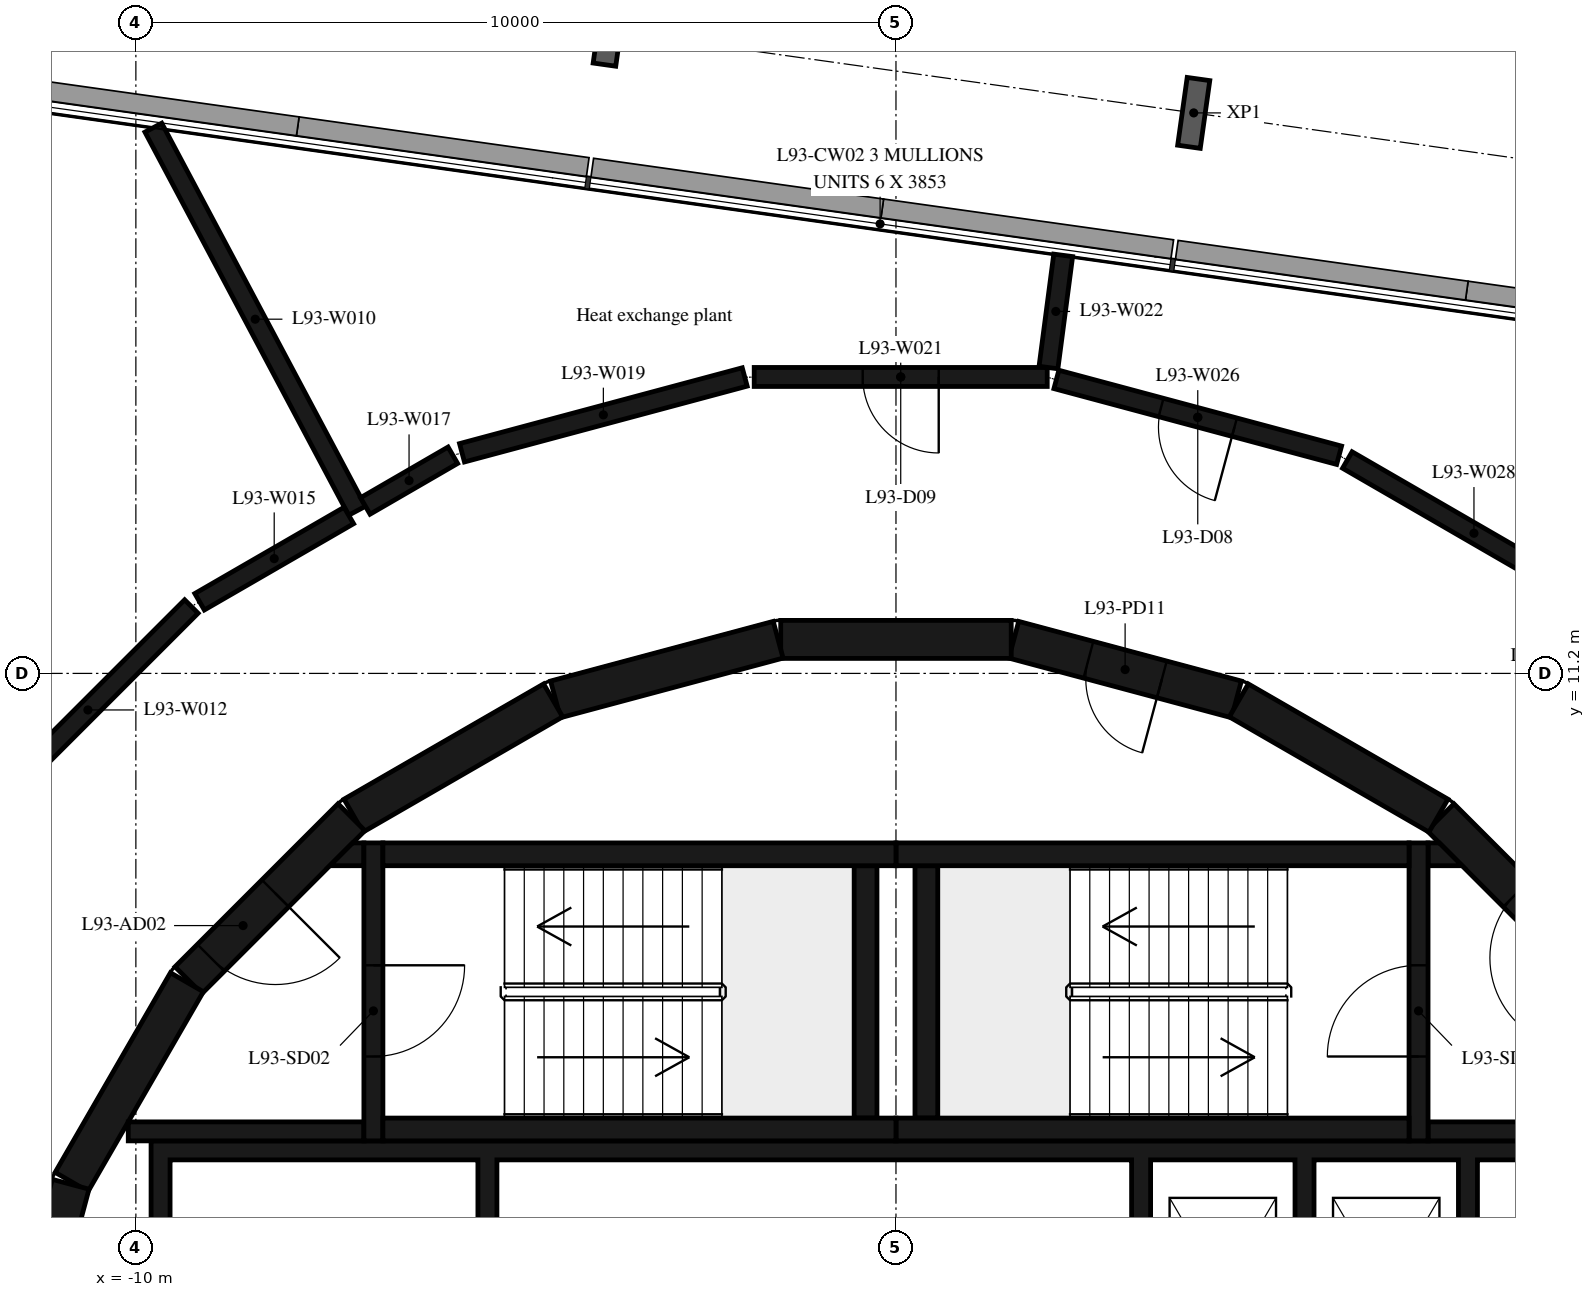
"""IFC4 building model, lengths in metres.
Left out: names, types, materials, properties, quantities, classifications, styles, units other than length and angle.
Written with IfcOpenShell. Run it as: python <this file> out.ifc"""

import sys

from ifc_helpers import new_model, si_unit, direction, frame, frame_2d, origin, origin_2d, place, context, subcontext, project, spatial, polyline, rectangle, i_section, outline, extrude, element, fill, save


model = new_model("IFC4")
c1 = context("Model", 3, precision=1e-05, world=origin(), true_north=direction((0.0, 1.0)))
c2 = subcontext(c1, "Body", "Model", "MODEL_VIEW")
j1 = project(units=[si_unit("LENGTHUNIT", "METRE"), si_unit("PLANEANGLEUNIT", "RADIAN")], contexts=[c1])
p1 = place(None, origin())
s1 = spatial("IfcSite", under=j1, at=p1, CompositionType="ELEMENT")
p2 = place(p1, origin())
s2 = spatial("IfcBuilding", under=s1, at=p2, CompositionType="ELEMENT")
p3 = place(p2, frame((0.0, 0.0, 361.0)))
s3 = spatial("IfcBuildingStorey", under=s2, at=p3, CompositionType="ELEMENT", Elevation=361.0)
for number, where, z_axis, x_axis in (
    (1, (3.917, 18.574, -0.38), (0.0, 0.0, 1.0), (0.99, -0.139, 0.0)),
    (2, (-3.773, 19.655, -0.38), (0.0, 0.0, 1.0), (0.99, -0.139, 0.0)),
):
    element("IfcColumn", number, at=place(p3, frame(where, z_axis=z_axis, x_axis=x_axis)), inside=s3, PredefinedType="COLUMN", context=c2, shape_type="SweptSolid", body=[
        extrude(i_section(OverallWidth=0.3, OverallDepth=0.9, WebThickness=0.019, FlangeThickness=0.035, FilletRadius=0.03, at=origin_2d()), origin(), (0.0, 0.0, 1.0), 5.2),
    ])
p4 = place(p3, frame((9.308, 7.164, 0.0), z_axis=(0.0, 0.0, 1.0), x_axis=(-0.707106781187, 0.707106781187, 0.0)))
e3 = element("IfcWall", 3, at=p4, inside=s3, PredefinedType="SHEAR", context=c2, shape_type="SweptSolid", body=[
    extrude(rectangle(XDim=3.032, YDim=0.5, at=frame_2d((1.516, 0.0))), origin(), (0.0, 0.0, 1.0), 4.82),
])
p5 = place(p4, frame((0.416, 0.0, 0.0)))
e4 = element("IfcOpeningElement", 4, at=p5, cuts=e3, PredefinedType="OPENING", context=c2, shape_type="SweptSolid", body=[
    extrude(rectangle(XDim=1.2, YDim=2.1, at=frame_2d((0.6, 1.05))), frame((0.0, 0.26, 0.0), z_axis=(0.0, -1.0, 0.0), x_axis=(1.0, 0.0, 0.0)), (0.0, 0.0, 1.0), 0.52),
])
p6 = place(p3, frame((7.137, 9.329, 0.0), z_axis=(0.0, 0.0, 1.0), x_axis=(-0.865975092491, 0.500087131594, 0.0)))
e5 = element("IfcWall", 5, at=p6, inside=s3, PredefinedType="SHEAR", context=c2, shape_type="SweptSolid", body=[
    extrude(rectangle(XDim=3.033, YDim=0.5, at=frame_2d((1.516, 0.0))), origin(), (0.0, 0.0, 1.0), 4.82),
])
p7 = place(p3, frame((4.479, 10.858, 0.0), z_axis=(0.0, 0.0, 1.0), x_axis=(-0.965948410781, 0.258734743916, 0.0)))
e6 = element("IfcWall", 6, at=p7, inside=s3, PredefinedType="SHEAR", context=c2, shape_type="SweptSolid", body=[
    extrude(rectangle(XDim=3.033, YDim=0.5, at=frame_2d((1.516, 0.0))), origin(), (0.0, 0.0, 1.0), 4.82),
])
p8 = place(p7, frame((1.016, 0.0, 0.0)))
e7 = element("IfcOpeningElement", 7, at=p8, cuts=e6, PredefinedType="OPENING", context=c2, shape_type="SweptSolid", body=[
    extrude(rectangle(XDim=1.0, YDim=2.4, at=frame_2d((0.5, 1.2))), frame((0.0, 0.26, 0.0), z_axis=(0.0, -1.0, 0.0), x_axis=(1.0, 0.0, 0.0)), (0.0, 0.0, 1.0), 0.52),
])
for number, where, z_axis, x_axis in (
    (8, (1.516, 11.647, 0.0), (0.0, 0.0, 1.0), (-1.0, 0.0, 0.0)),
    (9, (-1.55, 11.643, 0.0), (0.0, 0.0, 1.0), (-0.966, -0.259, 0.0)),
    (10, (-4.51, 10.845, 0.0), (0.0, 0.0, 1.0), (-0.866, -0.5, 0.0)),
):
    element("IfcWall", number, at=place(p3, frame(where, z_axis=z_axis, x_axis=x_axis)), inside=s3, PredefinedType="SHEAR", context=c2, shape_type="SweptSolid", body=[
        extrude(rectangle(XDim=3.033, YDim=0.5, at=frame_2d((1.516, 0.0))), origin(), (0.0, 0.0, 1.0), 4.82),
    ])
p9 = place(p3, frame((-7.164, 9.308, 0.0), z_axis=(0.0, 0.0, 1.0), x_axis=(-0.707106781187, -0.707106781187, 0.0)))
e11 = element("IfcWall", 11, at=p9, inside=s3, PredefinedType="SHEAR", context=c2, shape_type="SweptSolid", body=[
    extrude(rectangle(XDim=3.032, YDim=0.5, at=frame_2d((1.516, 0.0))), origin(), (0.0, 0.0, 1.0), 4.82),
])
p10 = place(p9, frame((1.416, 0.0, 0.0)))
e12 = element("IfcOpeningElement", 12, at=p10, cuts=e11, PredefinedType="OPENING", context=c2, shape_type="SweptSolid", body=[
    extrude(rectangle(XDim=1.2, YDim=2.1, at=frame_2d((0.6, 1.05))), frame((0.0, 0.26, 0.0), z_axis=(0.0, -1.0, 0.0), x_axis=(1.0, 0.0, 0.0)), (0.0, 0.0, 1.0), 0.52),
])
for number, where, z_axis, x_axis in (
    (13, (-9.329, 7.137, 0.0), (0.0, 0.0, 1.0), (-0.5, -0.866, 0.0)),
    (14, (-10.858, 4.479, 0.0), (0.0, 0.0, 1.0), (-0.259, -0.966, 0.0)),
):
    element("IfcWall", number, at=place(p3, frame(where, z_axis=z_axis, x_axis=x_axis)), inside=s3, PredefinedType="SHEAR", context=c2, shape_type="SweptSolid", body=[
        extrude(rectangle(XDim=3.033, YDim=0.5, at=frame_2d((1.516, 0.0))), origin(), (0.0, 0.0, 1.0), 4.82),
    ])
for number, where, z_axis, x_axis in (
    (15, (0.0, 5.2, 0.0), (0.0, 0.0, 1.0), (1.0, 0.0, 0.0)),
    (16, (0.0, 8.82, 0.0), (0.0, 0.0, 1.0), (1.0, 0.0, 0.0)),
):
    element("IfcWall", number, at=place(p3, frame(where, z_axis=z_axis, x_axis=x_axis)), inside=s3, PredefinedType="SHEAR", context=c2, shape_type="SweptSolid", body=[
        extrude(rectangle(XDim=6.75, YDim=0.3, at=frame_2d((3.375, 0.0))), origin(), (0.0, 0.0, 1.0), 4.82),
    ])
p11 = place(p3, frame((0.4, 5.35, 0.0), z_axis=(0.0, 0.0, 1.0), x_axis=(0.0, 1.0, 0.0)))
e17 = element("IfcWall", 17, at=p11, inside=s3, PredefinedType="SHEAR", context=c2, shape_type="SweptSolid", body=[
    extrude(rectangle(XDim=3.32, YDim=0.3, at=frame_2d((1.66, 0.0))), origin(), (0.0, 0.0, 1.0), 4.82),
])
p12 = place(p3, frame((6.875, 5.05, 0.0), z_axis=(0.0, 0.0, 1.0), x_axis=(0.0, 1.0, 0.0)))
e18 = element("IfcWall", 18, at=p12, inside=s3, PredefinedType="SHEAR", context=c2, shape_type="SweptSolid", body=[
    extrude(rectangle(XDim=3.92, YDim=0.25, at=frame_2d((1.96, 0.0))), origin(), (0.0, 0.0, 1.0), 4.82),
])
p13 = place(p12, frame((1.11, 0.0, 0.0)))
e19 = element("IfcOpeningElement", 19, at=p13, cuts=e18, PredefinedType="OPENING", context=c2, shape_type="SweptSolid", body=[
    extrude(rectangle(XDim=1.2, YDim=2.1, at=frame_2d((0.6, 1.05))), frame((0.0, 0.135, 0.0), z_axis=(0.0, -1.0, 0.0), x_axis=(1.0, 0.0, 0.0)), (0.0, 0.0, 1.0), 0.27),
])
p14 = place(p3, frame((7.0, 5.175, 0.0), z_axis=(0.0, 0.0, 1.0), x_axis=(1.0, 0.0, 0.0)))
e20 = element("IfcWall", 20, at=p14, inside=s3, PredefinedType="SHEAR", context=c2, shape_type="SweptSolid", body=[
    extrude(rectangle(XDim=3.1, YDim=0.25, at=frame_2d((1.55, 0.0))), origin(), (0.0, 0.0, 1.0), 4.82),
])
p15 = place(p3, origin())
e21 = element("IfcWall", 21, at=p15, inside=s3, PredefinedType="SHEAR", context=c2, shape_type="SweptSolid", body=[
    extrude(outline(polyline([(7.448, 8.67), (7.0, 8.67), (7.0, 8.97), (7.148, 8.97), (7.448, 8.67)])), origin(), (0.0, 0.0, 1.0), 4.82),
])
for number, where, z_axis, x_axis in (
    (22, (-6.75, 5.2, 0.0), (0.0, 0.0, 1.0), (1.0, 0.0, 0.0)),
    (23, (-6.75, 8.82, 0.0), (0.0, 0.0, 1.0), (1.0, 0.0, 0.0)),
):
    element("IfcWall", number, at=place(p3, frame(where, z_axis=z_axis, x_axis=x_axis)), inside=s3, PredefinedType="SHEAR", context=c2, shape_type="SweptSolid", body=[
        extrude(rectangle(XDim=6.75, YDim=0.3, at=frame_2d((3.375, 0.0))), origin(), (0.0, 0.0, 1.0), 4.82),
    ])
p16 = place(p3, frame((-0.4, 5.35, 0.0), z_axis=(0.0, 0.0, 1.0), x_axis=(0.0, 1.0, 0.0)))
e24 = element("IfcWall", 24, at=p16, inside=s3, PredefinedType="SHEAR", context=c2, shape_type="SweptSolid", body=[
    extrude(rectangle(XDim=3.32, YDim=0.3, at=frame_2d((1.66, 0.0))), origin(), (0.0, 0.0, 1.0), 4.82),
])
p17 = place(p3, frame((-6.875, 8.97, 0.0), z_axis=(0.0, 0.0, 1.0), x_axis=(0.0, -1.0, 0.0)))
e25 = element("IfcWall", 25, at=p17, inside=s3, PredefinedType="SHEAR", context=c2, shape_type="SweptSolid", body=[
    extrude(rectangle(XDim=3.92, YDim=0.25, at=frame_2d((1.96, 0.0))), origin(), (0.0, 0.0, 1.0), 4.82),
])
p18 = place(p17, frame((1.61, 0.0, 0.0)))
e26 = element("IfcOpeningElement", 26, at=p18, cuts=e25, PredefinedType="OPENING", context=c2, shape_type="SweptSolid", body=[
    extrude(rectangle(XDim=1.2, YDim=2.1, at=frame_2d((0.6, 1.05))), frame((0.0, 0.135, 0.0), z_axis=(0.0, -1.0, 0.0), x_axis=(1.0, 0.0, 0.0)), (0.0, 0.0, 1.0), 0.27),
])
p19 = place(p3, frame((-7.0, 5.175, 0.0), z_axis=(0.0, 0.0, 1.0), x_axis=(-1.0, 0.0, 0.0)))
e27 = element("IfcWall", 27, at=p19, inside=s3, PredefinedType="SHEAR", context=c2, shape_type="SweptSolid", body=[
    extrude(rectangle(XDim=3.1, YDim=0.25, at=frame_2d((1.55, 0.0))), origin(), (0.0, 0.0, 1.0), 4.82),
])
p20 = place(p3, origin())
e28 = element("IfcWall", 28, at=p20, inside=s3, PredefinedType="SHEAR", context=c2, shape_type="SweptSolid", body=[
    extrude(outline(polyline([(-7.148, 8.97), (-7.0, 8.97), (-7.0, 8.67), (-7.448, 8.67), (-7.148, 8.97)])), origin(), (0.0, 0.0, 1.0), 4.82),
])
p21 = place(p3, origin())
e29 = element("IfcWall", 29, at=p21, inside=s3, PredefinedType="SHEAR", context=c2, shape_type="SweptSolid", body=[
    extrude(outline(polyline([(-9.8, 1.9), (-9.55, 1.9), (-9.55, 4.8), (-5.5, 4.8), (-5.5, 1.9), (-5.25, 1.9), (-5.25, 4.8), (3.1, 4.8), (3.1, 1.9), (3.35, 1.9), (3.35, 4.8), (5.25, 4.8), (5.25, 1.9), (5.5, 1.9), (5.5, 4.8), (7.4, 4.8), (7.4, 1.9), (7.65, 1.9), (7.65, 4.8), (9.55, 4.8), (9.55, 1.9), (9.8, 1.9), (9.8, 4.8), (9.8, 5.05), (-9.8, 5.05), (-9.8, 4.8), (-9.8, 1.9)])), origin(), (0.0, 0.0, 1.0), 4.82),
])
p22 = place(p3, frame((-9.77, 18.38, 0.0), z_axis=(0.0, 0.0, 1.0), x_axis=(0.469502312853, -0.882931242072, 0.0)))
e30 = element("IfcWall", 30, at=p22, inside=s3, PredefinedType="PARTITIONING", context=c2, shape_type="SweptSolid", body=[
    extrude(rectangle(XDim=5.708, YDim=0.25, at=frame_2d((2.854, 0.0))), origin(), (0.0, 0.0, 1.0), 4.82),
])
p23 = place(p3, frame((-9.27, 12.08, 0.0), z_axis=(0.0, 0.0, 1.0), x_axis=(-0.707106781187, -0.707106781187, 0.0)))
e31 = element("IfcWall", 31, at=p23, inside=s3, PredefinedType="PARTITIONING", context=c2, shape_type="SweptSolid", body=[
    extrude(rectangle(XDim=3.849, YDim=0.25, at=frame_2d((1.925, 0.0))), origin(), (0.0, 0.0, 1.0), 4.82),
])
p24 = place(p3, frame((-7.198, 13.277, 0.0), z_axis=(0.0, 0.0, 1.0), x_axis=(-0.865821548015, -0.500352922439, 0.0)))
e32 = element("IfcWall", 32, at=p24, inside=s3, PredefinedType="PARTITIONING", context=c2, shape_type="SweptSolid", body=[
    extrude(rectangle(XDim=2.268, YDim=0.25, at=frame_2d((1.134, 0.0))), origin(), (0.0, 0.0, 1.0), 4.82),
])
p25 = place(p3, frame((-5.83, 14.07, 0.0), z_axis=(0.0, 0.0, 1.0), x_axis=(-0.865225325987, -0.501383221968, 0.0)))
e33 = element("IfcWall", 33, at=p25, inside=s3, PredefinedType="PARTITIONING", context=c2, shape_type="SweptSolid", body=[
    extrude(rectangle(XDim=1.331, YDim=0.25, at=frame_2d((0.666, 0.0))), origin(), (0.0, 0.0, 1.0), 4.82),
])
p26 = place(p3, frame((-1.99, 15.1, 0.0), z_axis=(0.0, 0.0, 1.0), x_axis=(-0.965845546311, -0.259118468411, 0.0)))
e34 = element("IfcWall", 34, at=p26, inside=s3, PredefinedType="PARTITIONING", context=c2, shape_type="SweptSolid", body=[
    extrude(rectangle(XDim=3.851, YDim=0.25, at=frame_2d((1.925, 0.0))), origin(), (0.0, 0.0, 1.0), 4.82),
])
p27 = place(p3, frame((1.99, 15.1, 0.0), z_axis=(0.0, 0.0, 1.0), x_axis=(-1.0, 0.0, 0.0)))
e35 = element("IfcWall", 35, at=p27, inside=s3, PredefinedType="PARTITIONING", context=c2, shape_type="SweptSolid", body=[
    extrude(rectangle(XDim=3.855, YDim=0.25, at=frame_2d((1.927, 0.0))), origin(), (0.0, 0.0, 1.0), 4.82),
])
p28 = place(p27, frame((1.427, 0.0, 0.0)))
e36 = element("IfcOpeningElement", 36, at=p28, cuts=e35, PredefinedType="OPENING", context=c2, shape_type="SweptSolid", body=[
    extrude(rectangle(XDim=1.0, YDim=2.1, at=frame_2d((0.5, 1.05))), frame((0.0, 0.135, 0.0), z_axis=(0.0, -1.0, 0.0), x_axis=(1.0, 0.0, 0.0)), (0.0, 0.0, 1.0), 0.27),
])
p29 = place(p3, frame((2.006, 15.224, 0.0), z_axis=(0.0, 0.0, 1.0), x_axis=(0.13004725163, 0.991507797419, 0.0)))
e37 = element("IfcWall", 37, at=p29, inside=s3, PredefinedType="PARTITIONING", context=c2, shape_type="SweptSolid", body=[
    extrude(rectangle(XDim=1.489, YDim=0.25, at=frame_2d((0.744, 0.0))), origin(), (0.0, 0.0, 1.0), 4.82),
])
p30 = place(p3, frame((5.83, 14.07, 0.0), z_axis=(0.0, 0.0, 1.0), x_axis=(-0.965861411942, 0.259059323171, 0.0)))
e38 = element("IfcWall", 38, at=p30, inside=s3, PredefinedType="PARTITIONING", context=c2, shape_type="SweptSolid", body=[
    extrude(rectangle(XDim=3.851, YDim=0.25, at=frame_2d((1.925, 0.0))), origin(), (0.0, 0.0, 1.0), 4.82),
])
p31 = place(p30, frame((1.425, 0.0, 0.0)))
e39 = element("IfcOpeningElement", 39, at=p31, cuts=e38, PredefinedType="OPENING", context=c2, shape_type="SweptSolid", body=[
    extrude(rectangle(XDim=1.0, YDim=2.1, at=frame_2d((0.5, 1.05))), frame((0.0, 0.135, 0.0), z_axis=(0.0, -1.0, 0.0), x_axis=(1.0, 0.0, 0.0)), (0.0, 0.0, 1.0), 0.27),
])
p32 = place(p3, frame((9.27, 12.08, 0.0), z_axis=(0.0, 0.0, 1.0), x_axis=(-0.865615852585, 0.500708693508, 0.0)))
e40 = element("IfcWall", 40, at=p32, inside=s3, PredefinedType="PARTITIONING", context=c2, shape_type="SweptSolid", body=[
    extrude(rectangle(XDim=3.849, YDim=0.25, at=frame_2d((1.925, 0.0))), origin(), (0.0, 0.0, 1.0), 4.82),
])
p33 = place(p13, origin())
e41 = element("IfcDoor", 41, at=p33, inside=s3, OperationType="SINGLE_SWING_LEFT", PredefinedType="DOOR", context=c2, shape_type="SweptSolid", body=[
    extrude(rectangle(XDim=1.2, YDim=2.1, at=frame_2d((0.6, 1.05))), frame((0.0, 0.025, 0.0), z_axis=(0.0, -1.0, 0.0), x_axis=(1.0, 0.0, 0.0)), (0.0, 0.0, 1.0), 0.05),
])
fill(e19, e41)
p34 = place(p5, origin())
e42 = element("IfcDoor", 42, at=p34, inside=s3, OperationType="SINGLE_SWING_RIGHT", PredefinedType="DOOR", context=c2, shape_type="SweptSolid", body=[
    extrude(rectangle(XDim=1.2, YDim=2.1, at=frame_2d((0.6, 1.05))), frame((0.0, 0.025, 0.0), z_axis=(0.0, -1.0, 0.0), x_axis=(1.0, 0.0, 0.0)), (0.0, 0.0, 1.0), 0.05),
])
fill(e4, e42)
p35 = place(p18, origin())
e43 = element("IfcDoor", 43, at=p35, inside=s3, OperationType="SINGLE_SWING_LEFT", PredefinedType="DOOR", context=c2, shape_type="SweptSolid", body=[
    extrude(rectangle(XDim=1.2, YDim=2.1, at=frame_2d((0.6, 1.05))), frame((0.0, 0.025, 0.0), z_axis=(0.0, -1.0, 0.0), x_axis=(1.0, 0.0, 0.0)), (0.0, 0.0, 1.0), 0.05),
])
fill(e26, e43)
p36 = place(p10, origin())
e44 = element("IfcDoor", 44, at=p36, inside=s3, OperationType="SINGLE_SWING_RIGHT", PredefinedType="DOOR", context=c2, shape_type="SweptSolid", body=[
    extrude(rectangle(XDim=1.2, YDim=2.1, at=frame_2d((0.6, 1.05))), frame((0.0, 0.025, 0.0), z_axis=(0.0, -1.0, 0.0), x_axis=(1.0, 0.0, 0.0)), (0.0, 0.0, 1.0), 0.05),
])
fill(e12, e44)
p37 = place(p8, origin())
e45 = element("IfcDoor", 45, at=p37, inside=s3, OperationType="SINGLE_SWING_RIGHT", PredefinedType="DOOR", context=c2, shape_type="SweptSolid", body=[
    extrude(rectangle(XDim=1.0, YDim=2.4, at=frame_2d((0.5, 1.2))), frame((0.0, 0.025, 0.0), z_axis=(0.0, -1.0, 0.0), x_axis=(1.0, 0.0, 0.0)), (0.0, 0.0, 1.0), 0.05),
])
fill(e7, e45)
p38 = place(p31, origin())
e46 = element("IfcDoor", 46, at=p38, inside=s3, OperationType="SINGLE_SWING_LEFT", PredefinedType="DOOR", context=c2, shape_type="SweptSolid", body=[
    extrude(rectangle(XDim=1.0, YDim=2.1, at=frame_2d((0.5, 1.05))), frame((0.0, 0.025, 0.0), z_axis=(0.0, -1.0, 0.0), x_axis=(1.0, 0.0, 0.0)), (0.0, 0.0, 1.0), 0.05),
])
fill(e39, e46)
p39 = place(p28, origin())
e47 = element("IfcDoor", 47, at=p39, inside=s3, OperationType="SINGLE_SWING_LEFT", PredefinedType="DOOR", context=c2, shape_type="SweptSolid", body=[
    extrude(rectangle(XDim=1.0, YDim=2.1, at=frame_2d((0.5, 1.05))), frame((0.0, 0.025, 0.0), z_axis=(0.0, -1.0, 0.0), x_axis=(1.0, 0.0, 0.0)), (0.0, 0.0, 1.0), 0.05),
])
fill(e36, e47)
save(model, sys.argv[1])
